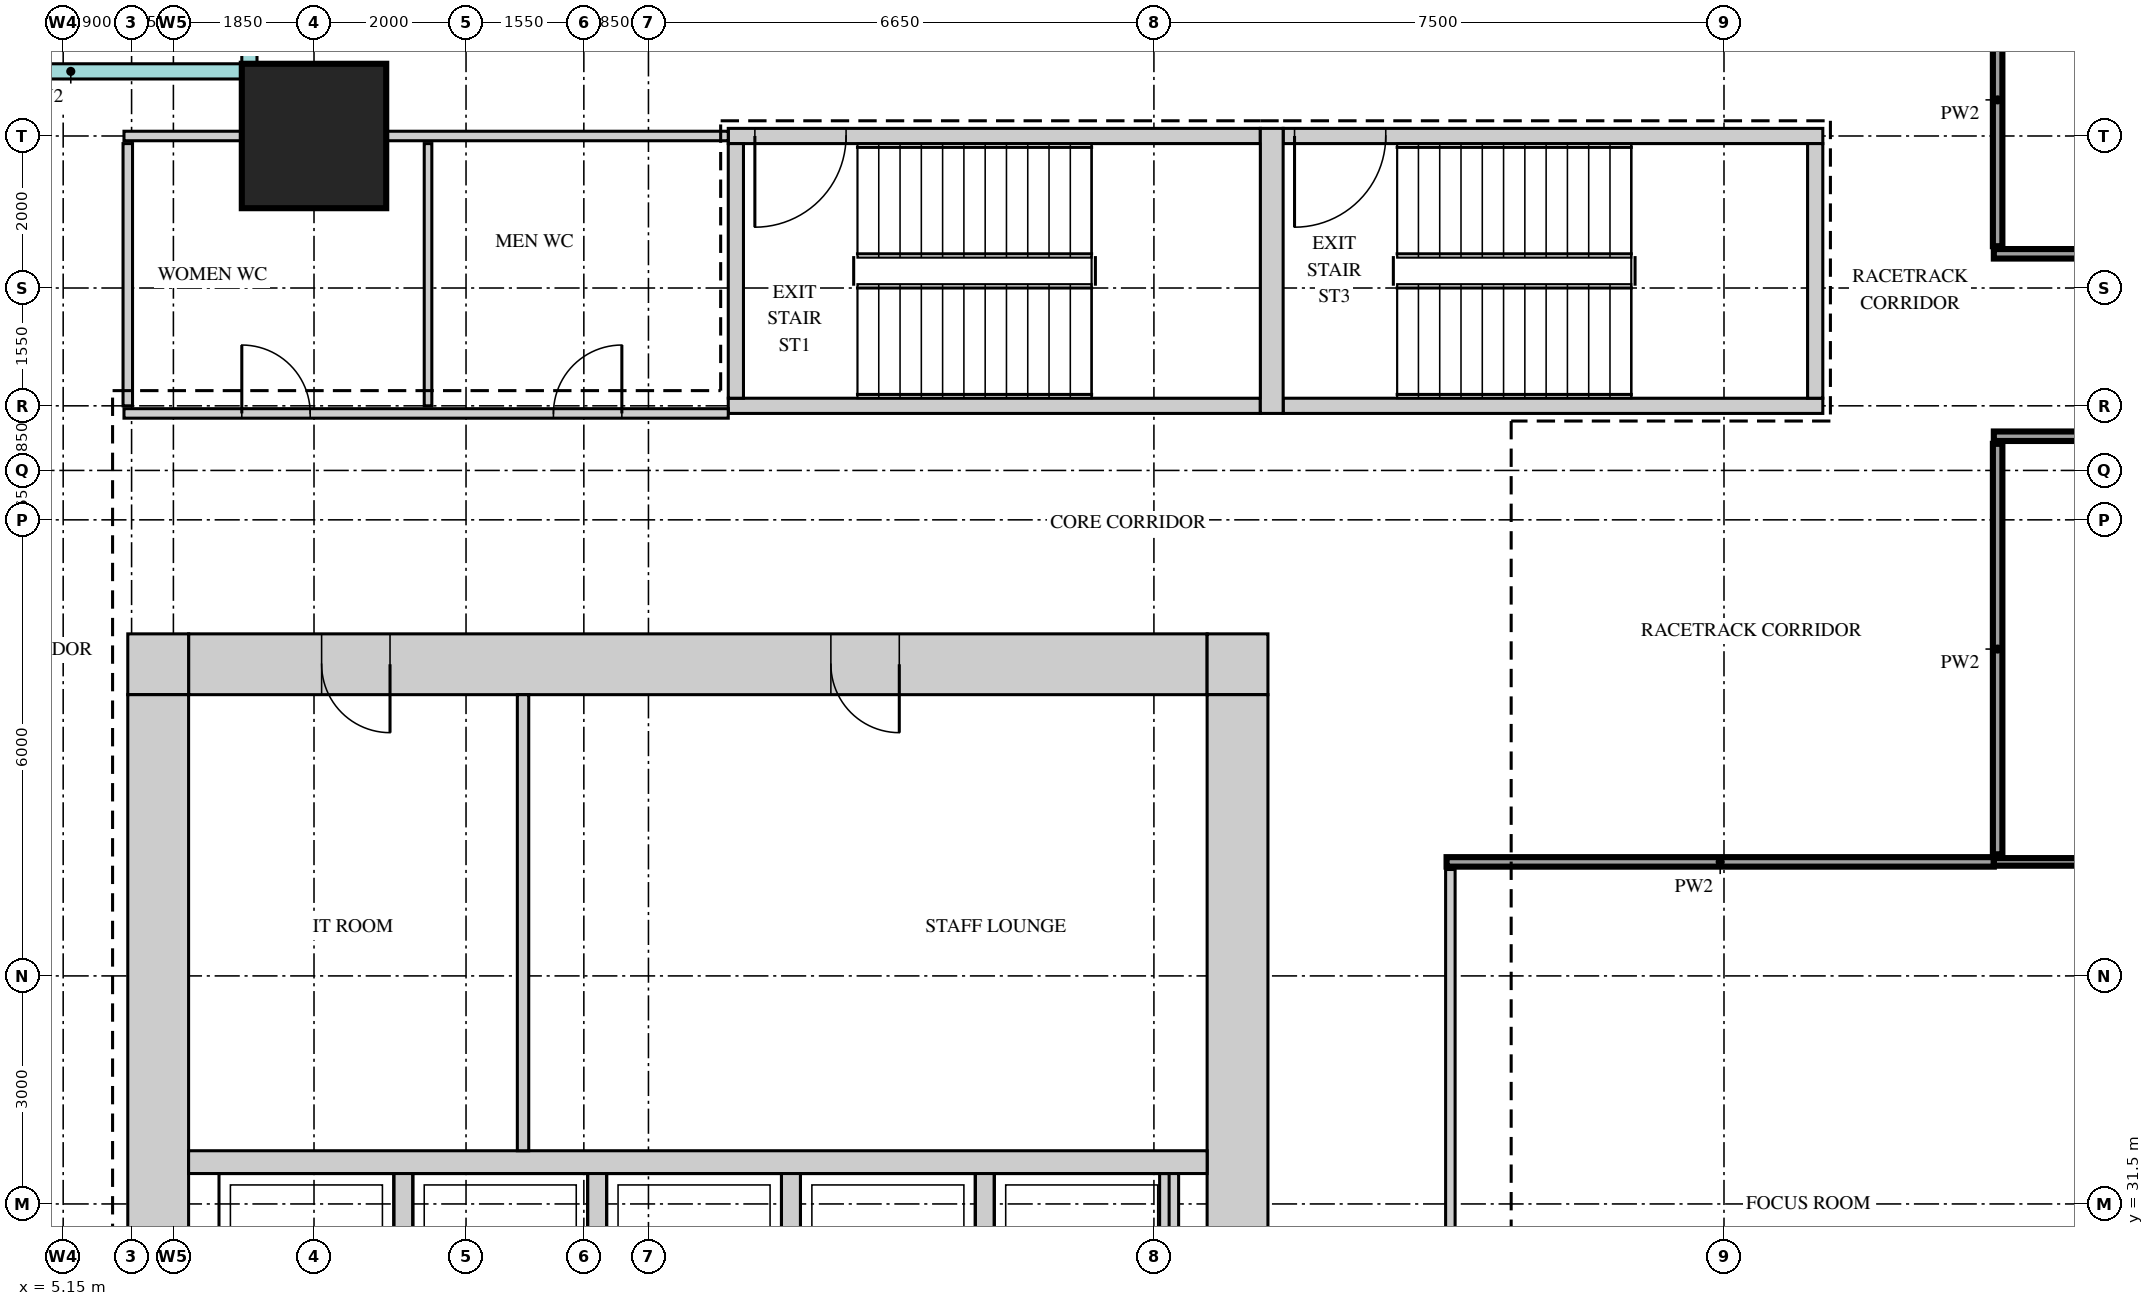
"""IFC4 building model, lengths in metres.
Left out: names, types, materials, properties, quantities, classifications, styles, units other than length and angle.
Written with IfcOpenShell. Run it as: python <this file> out.ifc"""

import sys

from ifc_helpers import new_model, si_unit, direction, frame, frame_2d, origin, origin_2d, place, context, subcontext, project, spatial, rectangle, extrude, source, transform, mapped, element, fill, save


model = new_model("IFC4")
c1 = context("Model", 3, precision=1e-05, world=origin(), true_north=direction((0.0, 1.0)))
c2 = subcontext(c1, "Body", "Model", "MODEL_VIEW")
j1 = project(units=[si_unit("LENGTHUNIT", "METRE"), si_unit("PLANEANGLEUNIT", "RADIAN")], contexts=[c1])
p1 = place(None, origin())
s1 = spatial("IfcSite", under=j1, at=p1, CompositionType="ELEMENT")
p2 = place(p1, origin())
s2 = spatial("IfcBuilding", under=s1, at=p2, CompositionType="ELEMENT")
p3 = place(p2, frame((0.0, 0.0, 196.7)))
s3 = spatial("IfcBuildingStorey", under=s2, at=p3, CompositionType="ELEMENT", Elevation=196.7)
m1 = source(origin(), c2, "Body", "SweptSolid", [
    extrude(rectangle(XDim=13.4, YDim=0.8, at=frame_2d((6.7, 0.0))), origin(), (0.0, 0.0, 1.0), 3.75),
])
p4 = place(p3, frame((6.8, 38.6, 0.0), z_axis=(0.0, 0.0, 1.0), x_axis=(1.0, 0.0, 0.0)))
e1 = element("IfcWall", 1, at=p4, inside=s3, PredefinedType="SHEAR", context=c2, shape_type="MappedRepresentation", body=[
    mapped(m1, transform((0.0, 0.0, 0.0))),
])
m2 = source(origin(), c2, "Body", "SweptSolid", [
    extrude(rectangle(XDim=0.9, YDim=2.1, at=frame_2d((0.45, 1.05))), frame((0.0, 0.41, 0.0), z_axis=(0.0, -1.0, 0.0), x_axis=(1.0, 0.0, 0.0)), (0.0, 0.0, 1.0), 0.82),
])
p5 = place(p4, frame((1.75, 0.0, 0.0)))
e2 = element("IfcOpeningElement", 2, at=p5, cuts=e1, PredefinedType="OPENING", context=c2, shape_type="MappedRepresentation", body=[
    mapped(m2, transform((0.0, 0.0, 0.0))),
])
p6 = place(p4, frame((8.45, 0.0, 0.0)))
e3 = element("IfcOpeningElement", 3, at=p6, cuts=e1, PredefinedType="OPENING", context=c2, shape_type="MappedRepresentation", body=[
    mapped(m2, transform((0.0, 0.0, 0.0))),
])
m3 = source(origin(), c2, "Body", "SweptSolid", [
    extrude(rectangle(XDim=0.8, YDim=0.8, at=frame_2d((0.4, 0.0))), origin(), (0.0, 0.0, 1.0), 3.75),
])
for number, where, z_axis, x_axis in (
    (4, (20.2, 38.6, 0.0), (0.0, 0.0, 1.0), (1.0, 0.0, 0.0)),
    (5, (6.0, 38.6, 0.0), (0.0, 0.0, 1.0), (1.0, 0.0, 0.0)),
):
    element("IfcWall", number, at=place(p3, frame(where, z_axis=z_axis, x_axis=x_axis)), inside=s3, PredefinedType="SHEAR", context=c2, shape_type="MappedRepresentation", body=[
        mapped(m3, transform((0.0, 0.0, 0.0))),
    ])
m4 = source(origin(), c2, "Body", "SweptSolid", [
    extrude(rectangle(XDim=22.4, YDim=0.8, at=frame_2d((11.2, 0.0))), origin(), (0.0, 0.0, 1.0), 3.75),
])
p7 = place(p3, frame((20.6, 15.8, 0.0), z_axis=(0.0, 0.0, 1.0), x_axis=(0.0, 1.0, 0.0)))
e6 = element("IfcWall", 6, at=p7, inside=s3, PredefinedType="SHEAR", context=c2, shape_type="MappedRepresentation", body=[
    mapped(m4, transform((0.0, 0.0, 0.0))),
])
m5 = source(origin(), c2, "Body", "SweptSolid", [
    extrude(rectangle(XDim=1.8, YDim=2.1, at=frame_2d((0.9, 1.05))), frame((0.0, 0.41, 0.0), z_axis=(0.0, -1.0, 0.0), x_axis=(1.0, 0.0, 0.0)), (0.0, 0.0, 1.0), 0.82),
])
p8 = place(p7, frame((10.7, 0.0, 0.0)))
e7 = element("IfcOpeningElement", 7, at=p8, cuts=e6, PredefinedType="OPENING", context=c2, shape_type="MappedRepresentation", body=[
    mapped(m5, transform((0.0, 0.0, 0.0))),
])
p9 = place(p7, frame((0.35, 0.0, 0.0)))
e8 = element("IfcOpeningElement", 8, at=p9, cuts=e6, PredefinedType="OPENING", context=c2, shape_type="MappedRepresentation", body=[
    mapped(m2, transform((0.0, 0.0, 0.0))),
])
p10 = place(p7, frame((2.15, 0.0, 0.0)))
e9 = element("IfcOpeningElement", 9, at=p10, cuts=e6, PredefinedType="OPENING", context=c2, shape_type="MappedRepresentation", body=[
    mapped(m2, transform((0.0, 0.0, 0.0))),
])
m6 = source(origin(), c2, "Body", "SweptSolid", [
    extrude(rectangle(XDim=1.0, YDim=2.1, at=frame_2d((0.5, 1.05))), frame((0.0, 0.41, 0.0), z_axis=(0.0, -1.0, 0.0), x_axis=(1.0, 0.0, 0.0)), (0.0, 0.0, 1.0), 0.82),
])
p11 = place(p7, frame((4.85, 0.0, 0.0)))
e10 = element("IfcOpeningElement", 10, at=p11, cuts=e6, PredefinedType="OPENING", context=c2, shape_type="MappedRepresentation", body=[
    mapped(m6, transform((0.0, 0.0, 0.0))),
])
p12 = place(p3, frame((6.4, 15.8, 0.0), z_axis=(0.0, 0.0, 1.0), x_axis=(0.0, 1.0, 0.0)))
e11 = element("IfcWall", 11, at=p12, inside=s3, PredefinedType="SHEAR", context=c2, shape_type="MappedRepresentation", body=[
    mapped(m4, transform((0.0, 0.0, 0.0))),
])
m7 = source(origin(), c2, "Body", "SweptSolid", [
    extrude(rectangle(XDim=7.0, YDim=0.2, at=frame_2d((3.5, 0.0))), origin(), (0.0, 0.0, 1.0), 3.75),
])
p13 = place(p3, frame((13.9, 45.55, 0.0), z_axis=(0.0, 0.0, 1.0), x_axis=(1.0, 0.0, 0.0)))
e12 = element("IfcWall", 12, at=p13, inside=s3, PredefinedType="SHEAR", context=c2, shape_type="MappedRepresentation", body=[
    mapped(m7, transform((0.0, 0.0, 0.0))),
])
m8 = source(origin(), c2, "Body", "SweptSolid", [
    extrude(rectangle(XDim=1.2, YDim=2.1, at=frame_2d((0.6, 1.05))), frame((0.0, 0.11, 0.0), z_axis=(0.0, -1.0, 0.0), x_axis=(1.0, 0.0, 0.0)), (0.0, 0.0, 1.0), 0.22),
])
p14 = place(p13, frame((0.35, 0.0, 0.0)))
e13 = element("IfcOpeningElement", 13, at=p14, cuts=e12, PredefinedType="OPENING", context=c2, shape_type="MappedRepresentation", body=[
    mapped(m8, transform((0.0, 0.0, 0.0))),
])
p15 = place(p3, frame((13.9, 42.0, 0.0), z_axis=(0.0, 0.0, 1.0), x_axis=(1.0, 0.0, 0.0)))
e14 = element("IfcWall", 14, at=p15, inside=s3, PredefinedType="SHEAR", context=c2, shape_type="MappedRepresentation", body=[
    mapped(m7, transform((0.0, 0.0, 0.0))),
])
m9 = source(origin(), c2, "Body", "SweptSolid", [
    extrude(rectangle(XDim=7.1, YDim=0.2, at=frame_2d((3.55, 0.0))), origin(), (0.0, 0.0, 1.0), 3.75),
])
p16 = place(p3, frame((21.2, 45.55, 0.0), z_axis=(0.0, 0.0, 1.0), x_axis=(1.0, 0.0, 0.0)))
e15 = element("IfcWall", 15, at=p16, inside=s3, PredefinedType="SHEAR", context=c2, shape_type="MappedRepresentation", body=[
    mapped(m9, transform((0.0, 0.0, 0.0))),
])
p17 = place(p16, frame((0.15, 0.0, 0.0)))
e16 = element("IfcOpeningElement", 16, at=p17, cuts=e15, PredefinedType="OPENING", context=c2, shape_type="MappedRepresentation", body=[
    mapped(m8, transform((0.0, 0.0, 0.0))),
])
p18 = place(p3, frame((21.2, 42.0, 0.0), z_axis=(0.0, 0.0, 1.0), x_axis=(1.0, 0.0, 0.0)))
e17 = element("IfcWall", 17, at=p18, inside=s3, PredefinedType="SHEAR", context=c2, shape_type="MappedRepresentation", body=[
    mapped(m9, transform((0.0, 0.0, 0.0))),
])
m10 = source(origin(), c2, "Body", "SweptSolid", [
    extrude(rectangle(XDim=3.75, YDim=0.3, at=frame_2d((1.875, 0.0))), origin(), (0.0, 0.0, 1.0), 3.75),
])
p19 = place(p3, frame((21.05, 41.9, 0.0), z_axis=(0.0, 0.0, 1.0), x_axis=(0.0, 1.0, 0.0)))
e18 = element("IfcWall", 18, at=p19, inside=s3, PredefinedType="SHEAR", context=c2, shape_type="MappedRepresentation", body=[
    mapped(m10, transform((0.0, 0.0, 0.0))),
])
m11 = source(origin(), c2, "Body", "SweptSolid", [
    extrude(rectangle(XDim=3.35, YDim=0.2, at=frame_2d((1.675, 0.0))), origin(), (0.0, 0.0, 1.0), 3.75),
])
for number, where, z_axis, x_axis in (
    (19, (14.0, 42.1, 0.0), (0.0, 0.0, 1.0), (0.0, 1.0, 0.0)),
    (20, (28.2, 42.1, 0.0), (0.0, 0.0, 1.0), (0.0, 1.0, 0.0)),
):
    element("IfcWall", number, at=place(p3, frame(where, z_axis=z_axis, x_axis=x_axis)), inside=s3, PredefinedType="SHEAR", context=c2, shape_type="MappedRepresentation", body=[
        mapped(m11, transform((0.0, 0.0, 0.0))),
    ])
m12 = source(origin(), c2, "Body", "SweptSolid", [
    extrude(rectangle(XDim=13.4, YDim=0.3, at=frame_2d((6.7, 0.0))), origin(), (0.0, 0.0, 1.0), 3.75),
])
p20 = place(p3, frame((6.8, 32.05, 0.0), z_axis=(0.0, 0.0, 1.0), x_axis=(1.0, 0.0, 0.0)))
e21 = element("IfcWall", 21, at=p20, inside=s3, PredefinedType="STANDARD", context=c2, shape_type="MappedRepresentation", body=[
    mapped(m12, transform((0.0, 0.0, 0.0))),
])
m13 = source(origin(), c2, "Body", "SweptSolid", [
    extrude(rectangle(XDim=2.4, YDim=0.25, at=frame_2d((1.2, 0.0))), origin(), (0.0, 0.0, 1.0), 3.75),
])
for number, where, z_axis, x_axis in (
    (22, (17.275, 29.5, 0.0), (0.0, 0.0, 1.0), (0.0, 1.0, 0.0)),
    (23, (19.7, 29.5, 0.0), (0.0, 0.0, 1.0), (0.0, 1.0, 0.0)),
    (24, (9.625, 29.5, 0.0), (0.0, 0.0, 1.0), (0.0, 1.0, 0.0)),
    (25, (12.175, 29.5, 0.0), (0.0, 0.0, 1.0), (0.0, 1.0, 0.0)),
    (26, (14.725, 29.5, 0.0), (0.0, 0.0, 1.0), (0.0, 1.0, 0.0)),
):
    element("IfcWall", number, at=place(p3, frame(where, z_axis=z_axis, x_axis=x_axis)), inside=s3, PredefinedType="STANDARD", context=c2, shape_type="MappedRepresentation", body=[
        mapped(m13, transform((0.0, 0.0, 0.0))),
    ])
m14 = source(origin(), c2, "Body", "SweptSolid", [
    extrude(rectangle(XDim=1.9, YDim=1.9, at=origin_2d()), origin(), (0.0, 0.0, 1.0), 4.0),
])
p21 = place(p3, frame((8.45, 45.55, 0.0), z_axis=(0.0, 0.0, 1.0), x_axis=(1.0, 0.0, 0.0)))
e27 = element("IfcColumn", 27, at=p21, inside=s3, PredefinedType="COLUMN", context=c2, shape_type="MappedRepresentation", body=[
    mapped(m14, transform((0.0, 0.0, 0.0))),
])
m15 = source(origin(), c2, "Body", "SweptSolid", [
    extrude(rectangle(XDim=23.4, YDim=0.125, at=frame_2d((11.7, 0.0))), origin(), (0.0, 0.0, 1.0), 3.8),
])
p22 = place(p3, frame((23.4, 12.5, 0.0), z_axis=(0.0, 0.0, 1.0), x_axis=(0.0, 1.0, 0.0)))
e28 = element("IfcWall", 28, at=p22, inside=s3, PredefinedType="PARTITIONING", context=c2, shape_type="MappedRepresentation", body=[
    mapped(m15, transform((0.0, 0.0, 0.0))),
])
m16 = source(origin(), c2, "Body", "SweptSolid", [
    extrude(rectangle(XDim=1.2, YDim=2.1, at=frame_2d((0.6, 1.05))), frame((0.0, 0.073, 0.0), z_axis=(0.0, -1.0, 0.0), x_axis=(1.0, 0.0, 0.0)), (0.0, 0.0, 1.0), 0.145),
])
p23 = place(p22, frame((6.6, 0.0, 0.0)))
e29 = element("IfcOpeningElement", 29, at=p23, cuts=e28, PredefinedType="OPENING", context=c2, shape_type="MappedRepresentation", body=[
    mapped(m16, transform((0.0, 0.0, 0.0))),
])
m17 = source(origin(), c2, "Body", "SweptSolid", [
    extrude(rectangle(XDim=6.0, YDim=0.15, at=frame_2d((3.0, 0.0))), origin(), (0.0, 0.0, 1.0), 3.8),
])
p24 = place(p3, frame((11.2, 32.2, 0.0), z_axis=(0.0, 0.0, 1.0), x_axis=(0.0, 1.0, 0.0)))
e30 = element("IfcWall", 30, at=p24, inside=s3, PredefinedType="PARTITIONING", context=c2, shape_type="MappedRepresentation", body=[
    mapped(m17, transform((0.0, 0.0, 0.0))),
])
m18 = source(origin(), c2, "Body", "SweptSolid", [
    extrude(rectangle(XDim=7.2, YDim=0.125, at=frame_2d((3.6, 0.0))), origin(), (0.0, 0.0, 1.0), 3.8),
])
p25 = place(p3, frame((23.35, 36.0, 0.0), z_axis=(0.0, 0.0, 1.0), x_axis=(1.0, 0.0, 0.0)))
e31 = element("IfcWall", 31, at=p25, inside=s3, PredefinedType="PARTITIONING", context=c2, shape_type="MappedRepresentation", body=[
    mapped(m18, transform((0.0, 0.0, 0.0))),
])
m19 = source(origin(), c2, "Body", "SweptSolid", [
    extrude(rectangle(XDim=10.95, YDim=0.1, at=frame_2d((5.475, 0.0))), origin(), (0.0, 0.0, 1.0), 3.8),
])
p26 = place(p3, frame((30.55, 36.0, 0.0), z_axis=(0.0, 0.0, 1.0), x_axis=(1.0, 0.0, 0.0)))
e32 = element("IfcWall", 32, at=p26, inside=s3, PredefinedType="PARTITIONING", context=c2, shape_type="MappedRepresentation", body=[
    mapped(m19, transform((0.0, 0.0, 0.0))),
])
m20 = source(origin(), c2, "Body", "SweptSolid", [
    extrude(rectangle(XDim=5.4, YDim=0.125, at=frame_2d((2.7, 0.0))), origin(), (0.0, 0.0, 1.0), 3.8),
])
p27 = place(p3, frame((30.6, 36.1, 0.0), z_axis=(0.0, 0.0, 1.0), x_axis=(0.0, 1.0, 0.0)))
e33 = element("IfcWall", 33, at=p27, inside=s3, PredefinedType="PARTITIONING", context=c2, shape_type="MappedRepresentation", body=[
    mapped(m20, transform((0.0, 0.0, 0.0))),
])
m21 = source(origin(), c2, "Body", "SweptSolid", [
    extrude(rectangle(XDim=11.1, YDim=0.125, at=frame_2d((5.55, 0.0))), origin(), (0.0, 0.0, 1.0), 3.8),
])
p28 = place(p3, frame((30.55, 41.6, 0.0), z_axis=(0.0, 0.0, 1.0), x_axis=(1.0, 0.0, 0.0)))
e34 = element("IfcWall", 34, at=p28, inside=s3, PredefinedType="PARTITIONING", context=c2, shape_type="MappedRepresentation", body=[
    mapped(m21, transform((0.0, 0.0, 0.0))),
])
m22 = source(origin(), c2, "Body", "SweptSolid", [
    extrude(rectangle(XDim=0.9, YDim=2.1, at=frame_2d((0.45, 1.05))), frame((0.0, 0.073, 0.0), z_axis=(0.0, -1.0, 0.0), x_axis=(1.0, 0.0, 0.0)), (0.0, 0.0, 1.0), 0.145),
])
p29 = place(p28, frame((5.25, 0.0, 0.0)))
e35 = element("IfcOpeningElement", 35, at=p29, cuts=e34, PredefinedType="OPENING", context=c2, shape_type="MappedRepresentation", body=[
    mapped(m22, transform((0.0, 0.0, 0.0))),
])
m23 = source(origin(), c2, "Body", "SweptSolid", [
    extrude(rectangle(XDim=7.95, YDim=0.125, at=frame_2d((3.975, 0.0))), origin(), (0.0, 0.0, 1.0), 3.8),
])
p30 = place(p3, frame((5.95, 41.9, 0.0), z_axis=(0.0, 0.0, 1.0), x_axis=(1.0, 0.0, 0.0)))
e36 = element("IfcWall", 36, at=p30, inside=s3, PredefinedType="PARTITIONING", context=c2, shape_type="MappedRepresentation", body=[
    mapped(m23, transform((0.0, 0.0, 0.0))),
])
p31 = place(p30, frame((1.55, 0.0, 0.0)))
e37 = element("IfcOpeningElement", 37, at=p31, cuts=e36, PredefinedType="OPENING", context=c2, shape_type="MappedRepresentation", body=[
    mapped(m22, transform((0.0, 0.0, 0.0))),
])
p32 = place(p30, frame((5.65, 0.0, 0.0)))
e38 = element("IfcOpeningElement", 38, at=p32, cuts=e36, PredefinedType="OPENING", context=c2, shape_type="MappedRepresentation", body=[
    mapped(m22, transform((0.0, 0.0, 0.0))),
])
m24 = source(origin(), c2, "Body", "SweptSolid", [
    extrude(rectangle(XDim=3.45, YDim=0.125, at=frame_2d((1.725, 0.0))), origin(), (0.0, 0.0, 1.0), 3.8),
])
p33 = place(p3, frame((6.0, 42.0, 0.0), z_axis=(0.0, 0.0, 1.0), x_axis=(0.0, 1.0, 0.0)))
e39 = element("IfcWall", 39, at=p33, inside=s3, PredefinedType="PARTITIONING", context=c2, shape_type="MappedRepresentation", body=[
    mapped(m24, transform((0.0, 0.0, 0.0))),
])
m25 = source(origin(), c2, "Body", "SweptSolid", [
    extrude(rectangle(XDim=3.45, YDim=0.1, at=frame_2d((1.725, 0.0))), origin(), (0.0, 0.0, 1.0), 3.8),
])
p34 = place(p3, frame((9.95, 42.0, 0.0), z_axis=(0.0, 0.0, 1.0), x_axis=(0.0, 1.0, 0.0)))
e40 = element("IfcWall", 40, at=p34, inside=s3, PredefinedType="PARTITIONING", context=c2, shape_type="MappedRepresentation", body=[
    mapped(m25, transform((0.0, 0.0, 0.0))),
])
m26 = source(origin(), c2, "Body", "SweptSolid", [
    extrude(rectangle(XDim=13.4, YDim=0.125, at=frame_2d((6.7, 0.0))), origin(), (0.0, 0.0, 1.0), 3.8),
])
p35 = place(p3, frame((30.55, 44.0, 0.0), z_axis=(0.0, 0.0, 1.0), x_axis=(1.0, 0.0, 0.0)))
e41 = element("IfcWall", 41, at=p35, inside=s3, PredefinedType="PARTITIONING", context=c2, shape_type="MappedRepresentation", body=[
    mapped(m26, transform((0.0, 0.0, 0.0))),
])
p36 = place(p35, frame((5.3, 0.0, 0.0)))
e42 = element("IfcOpeningElement", 42, at=p36, cuts=e41, PredefinedType="OPENING", context=c2, shape_type="MappedRepresentation", body=[
    mapped(m22, transform((0.0, 0.0, 0.0))),
])
p37 = place(p35, frame((11.85, 0.0, 0.0)))
e43 = element("IfcOpeningElement", 43, at=p37, cuts=e41, PredefinedType="OPENING", context=c2, shape_type="MappedRepresentation", body=[
    mapped(m22, transform((0.0, 0.0, 0.0))),
])
m27 = source(origin(), c2, "Body", "SweptSolid", [
    extrude(rectangle(XDim=3.85, YDim=0.125, at=frame_2d((1.925, 0.0))), origin(), (0.0, 0.0, 1.0), 3.8),
])
p38 = place(p3, frame((30.6, 44.1, 0.0), z_axis=(0.0, 0.0, 1.0), x_axis=(0.0, 1.0, 0.0)))
e44 = element("IfcWall", 44, at=p38, inside=s3, PredefinedType="PARTITIONING", context=c2, shape_type="MappedRepresentation", body=[
    mapped(m27, transform((0.0, 0.0, 0.0))),
])
m28 = source(origin(), c2, "Body", "SweptSolid", [
    extrude(rectangle(XDim=7.95, YDim=0.125, at=frame_2d((3.975, 0.0))), origin(), (0.0, 0.0, 1.0), 3.25),
])
p39 = place(p3, frame((5.95, 45.55, 0.0), z_axis=(0.0, 0.0, 1.0), x_axis=(1.0, 0.0, 0.0)))
e45 = element("IfcWall", 45, at=p39, inside=s3, PredefinedType="PARTITIONING", context=c2, shape_type="MappedRepresentation", body=[
    mapped(m28, transform((0.0, 0.0, 0.0))),
])
m29 = source(origin(), c2, "Body", "SweptSolid", [
    extrude(rectangle(XDim=0.9, YDim=2.1, at=frame_2d((0.45, 1.05))), frame((0.0, 0.35, 0.0), z_axis=(0.0, -1.0, 0.0), x_axis=(1.0, 0.0, 0.0)), (0.0, 0.0, 1.0), 0.7),
])
p40 = place(p5, origin())
e46 = element("IfcDoor", 46, at=p40, inside=s3, OperationType="SINGLE_SWING_RIGHT", PredefinedType="DOOR", context=c2, shape_type="MappedRepresentation", body=[
    mapped(m29, transform((0.0, 0.0, 0.0))),
])
fill(e2, e46)
p41 = place(p6, origin())
e47 = element("IfcDoor", 47, at=p41, inside=s3, OperationType="SINGLE_SWING_RIGHT", PredefinedType="DOOR", context=c2, shape_type="MappedRepresentation", body=[
    mapped(m29, transform((0.0, 0.0, 0.0))),
])
fill(e3, e47)
m30 = source(origin(), c2, "Body", "SweptSolid", [
    extrude(rectangle(XDim=0.9, YDim=2.1, at=frame_2d((0.45, 1.05))), frame((0.0, 0.025, 0.0), z_axis=(0.0, -1.0, 0.0), x_axis=(1.0, 0.0, 0.0)), (0.0, 0.0, 1.0), 0.05),
])
p42 = place(p31, origin())
e48 = element("IfcDoor", 48, at=p42, inside=s3, OperationType="SINGLE_SWING_RIGHT", PredefinedType="DOOR", context=c2, shape_type="MappedRepresentation", body=[
    mapped(m30, transform((0.0, 0.0, 0.0))),
])
fill(e37, e48)
p43 = place(p32, origin())
e49 = element("IfcDoor", 49, at=p43, inside=s3, OperationType="SINGLE_SWING_LEFT", PredefinedType="DOOR", context=c2, shape_type="MappedRepresentation", body=[
    mapped(m30, transform((0.0, 0.0, 0.0))),
])
fill(e38, e49)
m31 = source(origin(), c2, "Body", "SweptSolid", [
    extrude(rectangle(XDim=1.2, YDim=2.1, at=frame_2d((0.6, 1.05))), frame((0.0, 0.025, 0.0), z_axis=(0.0, -1.0, 0.0), x_axis=(1.0, 0.0, 0.0)), (0.0, 0.0, 1.0), 0.05),
])
p44 = place(p14, origin())
e50 = element("IfcDoor", 50, at=p44, inside=s3, OperationType="SINGLE_SWING_LEFT", PredefinedType="DOOR", context=c2, shape_type="MappedRepresentation", body=[
    mapped(m31, transform((0.0, 0.0, 0.0))),
])
fill(e13, e50)
p45 = place(p17, origin())
e51 = element("IfcDoor", 51, at=p45, inside=s3, OperationType="SINGLE_SWING_LEFT", PredefinedType="DOOR", context=c2, shape_type="MappedRepresentation", body=[
    mapped(m31, transform((0.0, 0.0, 0.0))),
])
fill(e16, e51)
save(model, sys.argv[1])
